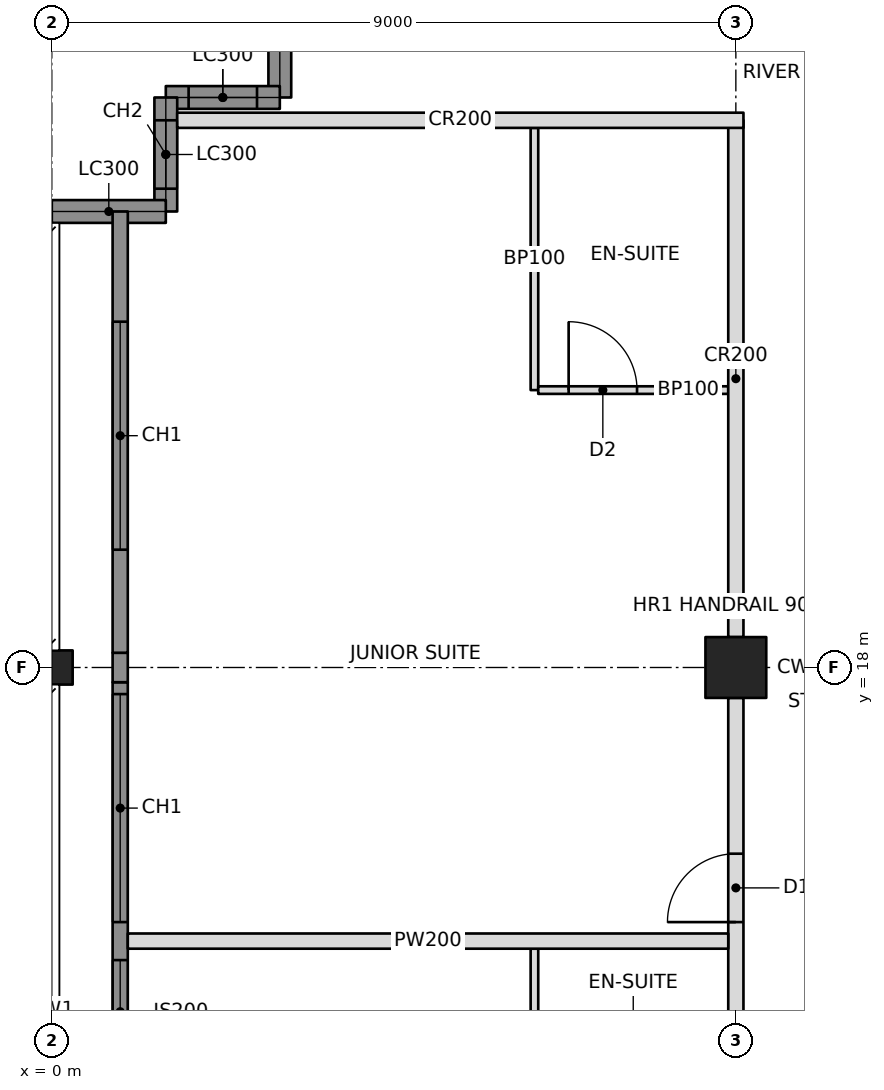
"""IFC4 building model, lengths in metres.
Left out: names, types, materials, properties, quantities, classifications, styles, units other than length and angle.
Written with IfcOpenShell. Run it as: python <this file> out.ifc"""

import sys

from ifc_helpers import new_model, si_unit, direction, frame, frame_2d, origin, origin_2d, place, context, subcontext, project, spatial, rectangle, hollow_rectangle, i_section, extrude, element, fill, save


model = new_model("IFC4")
c1 = context("Model", 3, precision=1e-05, world=origin(), true_north=direction((0.0, 1.0)))
c2 = subcontext(c1, "Body", "Model", "MODEL_VIEW")
j1 = project(units=[si_unit("LENGTHUNIT", "METRE"), si_unit("PLANEANGLEUNIT", "RADIAN")], contexts=[c1])
p1 = place(None, origin())
s1 = spatial("IfcSite", under=j1, at=p1, CompositionType="ELEMENT")
p2 = place(p1, origin())
s2 = spatial("IfcBuilding", under=s1, at=p2, CompositionType="ELEMENT")
p3 = place(p2, frame((0.0, 0.0, 174.0)))
s3 = spatial("IfcBuildingStorey", under=s2, at=p3, CompositionType="ELEMENT", Elevation=174.0)
p4 = place(p3, frame((0.0, 18.0, 0.0), z_axis=(0.0, 0.0, 1.0), x_axis=(0.0, 1.0, 0.0)))
e1 = element("IfcColumn", 1, at=p4, inside=s3, PredefinedType="COLUMN", context=c2, shape_type="SweptSolid", body=[
    extrude(i_section(OverallWidth=0.449, OverallDepth=0.549, WebThickness=0.072, FlangeThickness=0.115, at=origin_2d()), origin(), (0.0, 0.0, 1.0), 3.4),
])
p5 = place(p3, frame((9.0, 18.0, 0.0), z_axis=(0.0, 0.0, 1.0), x_axis=(1.0, 0.0, 0.0)))
e2 = element("IfcColumn", 2, at=p5, inside=s3, PredefinedType="COLUMN", context=c2, shape_type="SweptSolid", body=[
    extrude(hollow_rectangle(XDim=0.8, YDim=0.8, WallThickness=0.06, at=origin_2d()), origin(), (0.0, 0.0, 1.0), 3.4),
])
p6 = place(p3, frame((3.0, 27.0, 0.0), z_axis=(0.0, 0.0, 1.0), x_axis=(0.0, -1.0, 0.0)))
e3 = element("IfcWall", 3, at=p6, inside=s3, PredefinedType="SOLIDWALL", context=c2, shape_type="SweptSolid", body=[
    extrude(rectangle(XDim=1.5, YDim=0.3, at=frame_2d((0.75, 0.0))), origin(), (0.0, 0.0, 1.0), 2.42),
])
p7 = place(p3, frame((3.0, 25.5, 0.0), z_axis=(0.0, 0.0, 1.0), x_axis=(-1.0, 0.0, 0.0)))
e4 = element("IfcWall", 4, at=p7, inside=s3, PredefinedType="SOLIDWALL", context=c2, shape_type="SweptSolid", body=[
    extrude(rectangle(XDim=1.5, YDim=0.3, at=frame_2d((0.75, 0.0))), origin(), (0.0, 0.0, 1.0), 3.2),
])
p8 = place(p7, frame((0.3, 0.0, 0.6)))
e5 = element("IfcOpeningElement", 5, at=p8, cuts=e4, PredefinedType="OPENING", context=c2, shape_type="SweptSolid", body=[
    extrude(rectangle(XDim=0.9, YDim=2.2, at=frame_2d((0.45, 1.1))), frame((0.0, 0.16, 0.0), z_axis=(0.0, -1.0, 0.0), x_axis=(1.0, 0.0, 0.0)), (0.0, 0.0, 1.0), 0.32),
])
p9 = place(p3, frame((1.5, 25.5, 0.0), z_axis=(0.0, 0.0, 1.0), x_axis=(0.0, -1.0, 0.0)))
e6 = element("IfcWall", 6, at=p9, inside=s3, PredefinedType="SOLIDWALL", context=c2, shape_type="SweptSolid", body=[
    extrude(rectangle(XDim=1.5, YDim=0.3, at=frame_2d((0.75, 0.0))), origin(), (0.0, 0.0, 1.0), 3.2),
])
p10 = place(p9, frame((0.3, 0.0, 0.6)))
e7 = element("IfcOpeningElement", 7, at=p10, cuts=e6, PredefinedType="OPENING", context=c2, shape_type="SweptSolid", body=[
    extrude(rectangle(XDim=0.9, YDim=2.2, at=frame_2d((0.45, 1.1))), frame((0.0, 0.16, 0.0), z_axis=(0.0, -1.0, 0.0), x_axis=(1.0, 0.0, 0.0)), (0.0, 0.0, 1.0), 0.32),
])
p11 = place(p3, frame((1.5, 24.0, 0.0), z_axis=(0.0, 0.0, 1.0), x_axis=(-1.0, 0.0, 0.0)))
e8 = element("IfcWall", 8, at=p11, inside=s3, PredefinedType="SOLIDWALL", context=c2, shape_type="SweptSolid", body=[
    extrude(rectangle(XDim=1.5, YDim=0.3, at=frame_2d((0.75, 0.0))), origin(), (0.0, 0.0, 1.0), 2.42),
])
p12 = place(p3, frame((9.0, 10.8, 0.0), z_axis=(0.0, 0.0, 1.0), x_axis=(0.0, 1.0, 0.0)))
e9 = element("IfcWall", 9, at=p12, inside=s3, PredefinedType="PARTITIONING", context=c2, shape_type="SweptSolid", body=[
    extrude(rectangle(XDim=6.8, YDim=0.2, at=frame_2d((3.4, 0.0))), origin(), (0.0, 0.0, 1.0), 2.405),
])
p13 = place(p12, frame((0.25, 0.0, 0.0)))
e10 = element("IfcOpeningElement", 10, at=p13, cuts=e9, PredefinedType="OPENING", context=c2, shape_type="SweptSolid", body=[
    extrude(rectangle(XDim=0.9, YDim=2.1, at=frame_2d((0.45, 1.05))), frame((0.0, 0.11, 0.0), z_axis=(0.0, -1.0, 0.0), x_axis=(1.0, 0.0, 0.0)), (0.0, 0.0, 1.0), 0.22),
])
p14 = place(p12, frame((3.85, 0.0, 0.0)))
e11 = element("IfcOpeningElement", 11, at=p14, cuts=e9, PredefinedType="OPENING", context=c2, shape_type="SweptSolid", body=[
    extrude(rectangle(XDim=0.9, YDim=2.1, at=frame_2d((0.45, 1.05))), frame((0.0, 0.11, 0.0), z_axis=(0.0, -1.0, 0.0), x_axis=(1.0, 0.0, 0.0)), (0.0, 0.0, 1.0), 0.22),
])
p15 = place(p3, frame((9.0, 18.4, 0.0), z_axis=(0.0, 0.0, 1.0), x_axis=(0.0, 1.0, 0.0)))
e12 = element("IfcWall", 12, at=p15, inside=s3, PredefinedType="PARTITIONING", context=c2, shape_type="SweptSolid", body=[
    extrude(rectangle(XDim=6.8, YDim=0.2, at=frame_2d((3.4, 0.0))), origin(), (0.0, 0.0, 1.0), 2.405),
])
p16 = place(p3, frame((1.65, 25.2, 0.0), z_axis=(0.0, 0.0, 1.0), x_axis=(1.0, 0.0, 0.0)))
e13 = element("IfcWall", 13, at=p16, inside=s3, PredefinedType="PARTITIONING", context=c2, shape_type="SweptSolid", body=[
    extrude(rectangle(XDim=7.45, YDim=0.2, at=frame_2d((3.725, 0.0))), origin(), (0.0, 0.0, 1.0), 2.404),
])
p17 = place(p3, frame((8.9, 14.4, 0.0), z_axis=(0.0, 0.0, 1.0), x_axis=(-1.0, 0.0, 0.0)))
e14 = element("IfcWall", 14, at=p17, inside=s3, PredefinedType="PARTITIONING", context=c2, shape_type="SweptSolid", body=[
    extrude(rectangle(XDim=7.9, YDim=0.2, at=frame_2d((3.95, 0.0))), origin(), (0.0, 0.0, 1.0), 2.404),
])
p18 = place(p3, frame((6.35, 12.25, 0.0), z_axis=(0.0, 0.0, 1.0), x_axis=(0.0, 1.0, 0.0)))
e15 = element("IfcWall", 15, at=p18, inside=s3, PredefinedType="PARTITIONING", context=c2, shape_type="SweptSolid", body=[
    extrude(rectangle(XDim=2.05, YDim=0.1, at=frame_2d((1.025, 0.0))), origin(), (0.0, 0.0, 1.0), 3.2),
])
p19 = place(p3, frame((6.35, 21.65, 0.0), z_axis=(0.0, 0.0, 1.0), x_axis=(0.0, 1.0, 0.0)))
e16 = element("IfcWall", 16, at=p19, inside=s3, PredefinedType="PARTITIONING", context=c2, shape_type="SweptSolid", body=[
    extrude(rectangle(XDim=3.45, YDim=0.1, at=frame_2d((1.725, 0.0))), origin(), (0.0, 0.0, 1.0), 3.2),
])
p20 = place(p3, frame((8.9, 21.65, 0.0), z_axis=(0.0, 0.0, 1.0), x_axis=(-1.0, 0.0, 0.0)))
e17 = element("IfcWall", 17, at=p20, inside=s3, PredefinedType="PARTITIONING", context=c2, shape_type="SweptSolid", body=[
    extrude(rectangle(XDim=2.5, YDim=0.1, at=frame_2d((1.25, 0.0))), origin(), (0.0, 0.0, 1.0), 2.404),
])
p21 = place(p20, frame((1.2, 0.0, 0.0)))
e18 = element("IfcOpeningElement", 18, at=p21, cuts=e17, PredefinedType="OPENING", context=c2, shape_type="SweptSolid", body=[
    extrude(rectangle(XDim=0.9, YDim=2.1, at=frame_2d((0.45, 1.05))), frame((0.0, 0.06, 0.0), z_axis=(0.0, -1.0, 0.0), x_axis=(1.0, 0.0, 0.0)), (0.0, 0.0, 1.0), 0.12),
])
p22 = place(p3, frame((0.9, 9.135, 0.0), z_axis=(0.0, 0.0, 1.0), x_axis=(0.0, 1.0, 0.0)))
e19 = element("IfcWall", 19, at=p22, inside=s3, PredefinedType="SOLIDWALL", context=c2, shape_type="SweptSolid", body=[
    extrude(rectangle(XDim=8.671, YDim=0.2, at=frame_2d((4.335, 0.0))), origin(), (0.0, 0.0, 1.0), 3.2),
])
p23 = place(p22, frame((2.015, 0.0, 0.6)))
e20 = element("IfcOpeningElement", 20, at=p23, cuts=e19, PredefinedType="OPENING", context=c2, shape_type="SweptSolid", body=[
    extrude(rectangle(XDim=3.0, YDim=2.2, at=frame_2d((1.5, 1.1))), frame((0.0, 0.11, 0.0), z_axis=(0.0, -1.0, 0.0), x_axis=(1.0, 0.0, 0.0)), (0.0, 0.0, 1.0), 0.22),
])
p24 = place(p22, frame((5.515, 0.0, 0.6)))
e21 = element("IfcOpeningElement", 21, at=p24, cuts=e19, PredefinedType="OPENING", context=c2, shape_type="SweptSolid", body=[
    extrude(rectangle(XDim=3.0, YDim=2.2, at=frame_2d((1.5, 1.1))), frame((0.0, 0.11, 0.0), z_axis=(0.0, -1.0, 0.0), x_axis=(1.0, 0.0, 0.0)), (0.0, 0.0, 1.0), 0.22),
])
p25 = place(p3, frame((0.9, 17.806, 0.0), z_axis=(0.0, 0.0, 1.0), x_axis=(0.0, 1.0, 0.0)))
e22 = element("IfcWall", 22, at=p25, inside=s3, PredefinedType="SOLIDWALL", context=c2, shape_type="SweptSolid", body=[
    extrude(rectangle(XDim=0.388, YDim=0.2, at=frame_2d((0.194, 0.0))), origin(), (0.0, 0.0, 1.0), 2.404),
])
p26 = place(p3, frame((0.9, 18.194, 0.0), z_axis=(0.0, 0.0, 1.0), x_axis=(0.0, 1.0, 0.0)))
e23 = element("IfcWall", 23, at=p26, inside=s3, PredefinedType="SOLIDWALL", context=c2, shape_type="SweptSolid", body=[
    extrude(rectangle(XDim=5.806, YDim=0.2, at=frame_2d((2.903, 0.0))), origin(), (0.0, 0.0, 1.0), 3.2),
])
p27 = place(p26, frame((1.356, 0.0, 0.6)))
e24 = element("IfcOpeningElement", 24, at=p27, cuts=e23, PredefinedType="OPENING", context=c2, shape_type="SweptSolid", body=[
    extrude(rectangle(XDim=3.0, YDim=2.2, at=frame_2d((1.5, 1.1))), frame((0.0, 0.11, 0.0), z_axis=(0.0, -1.0, 0.0), x_axis=(1.0, 0.0, 0.0)), (0.0, 0.0, 1.0), 0.22),
])
p28 = place(p8, origin())
e25 = element("IfcWindow", 25, at=p28, inside=s3, PartitioningType="SINGLE_PANEL", PredefinedType="WINDOW", context=c2, shape_type="SweptSolid", body=[
    extrude(rectangle(XDim=0.9, YDim=2.2, at=frame_2d((0.45, 1.1))), frame((0.0, 0.03, 0.0), z_axis=(0.0, -1.0, 0.0), x_axis=(1.0, 0.0, 0.0)), (0.0, 0.0, 1.0), 0.06),
])
fill(e5, e25)
p29 = place(p10, origin())
e26 = element("IfcWindow", 26, at=p29, inside=s3, PartitioningType="SINGLE_PANEL", PredefinedType="WINDOW", context=c2, shape_type="SweptSolid", body=[
    extrude(rectangle(XDim=0.9, YDim=2.2, at=frame_2d((0.45, 1.1))), frame((0.0, 0.03, 0.0), z_axis=(0.0, -1.0, 0.0), x_axis=(1.0, 0.0, 0.0)), (0.0, 0.0, 1.0), 0.06),
])
fill(e7, e26)
p30 = place(p23, origin())
e27 = element("IfcWindow", 27, at=p30, inside=s3, PartitioningType="TRIPLE_PANEL_VERTICAL", PredefinedType="WINDOW", context=c2, shape_type="SweptSolid", body=[
    extrude(rectangle(XDim=3.0, YDim=2.2, at=frame_2d((1.5, 1.1))), frame((0.0, 0.03, 0.0), z_axis=(0.0, -1.0, 0.0), x_axis=(1.0, 0.0, 0.0)), (0.0, 0.0, 1.0), 0.06),
])
fill(e20, e27)
p31 = place(p24, origin())
e28 = element("IfcWindow", 28, at=p31, inside=s3, PartitioningType="TRIPLE_PANEL_VERTICAL", PredefinedType="WINDOW", context=c2, shape_type="SweptSolid", body=[
    extrude(rectangle(XDim=3.0, YDim=2.2, at=frame_2d((1.5, 1.1))), frame((0.0, 0.03, 0.0), z_axis=(0.0, -1.0, 0.0), x_axis=(1.0, 0.0, 0.0)), (0.0, 0.0, 1.0), 0.06),
])
fill(e21, e28)
p32 = place(p27, origin())
e29 = element("IfcWindow", 29, at=p32, inside=s3, PartitioningType="TRIPLE_PANEL_VERTICAL", PredefinedType="WINDOW", context=c2, shape_type="SweptSolid", body=[
    extrude(rectangle(XDim=3.0, YDim=2.2, at=frame_2d((1.5, 1.1))), frame((0.0, 0.03, 0.0), z_axis=(0.0, -1.0, 0.0), x_axis=(1.0, 0.0, 0.0)), (0.0, 0.0, 1.0), 0.06),
])
fill(e24, e29)
p33 = place(p21, frame((0.9, 0.0, 0.0), z_axis=(0.0, 0.0, 1.0), x_axis=(-1.0, 0.0, 0.0)))
e30 = element("IfcDoor", 30, at=p33, inside=s3, OperationType="SINGLE_SWING_LEFT", PredefinedType="DOOR", context=c2, shape_type="SweptSolid", body=[
    extrude(rectangle(XDim=0.9, YDim=2.1, at=frame_2d((0.45, 1.05))), frame((0.0, 0.025, 0.0), z_axis=(0.0, -1.0, 0.0), x_axis=(1.0, 0.0, 0.0)), (0.0, 0.0, 1.0), 0.05),
])
fill(e18, e30)
p34 = place(p14, origin())
e31 = element("IfcDoor", 31, at=p34, inside=s3, OperationType="SINGLE_SWING_LEFT", PredefinedType="DOOR", context=c2, shape_type="SweptSolid", body=[
    extrude(rectangle(XDim=0.9, YDim=2.1, at=frame_2d((0.45, 1.05))), frame((0.0, 0.025, 0.0), z_axis=(0.0, -1.0, 0.0), x_axis=(1.0, 0.0, 0.0)), (0.0, 0.0, 1.0), 0.05),
])
fill(e11, e31)
save(model, sys.argv[1])
